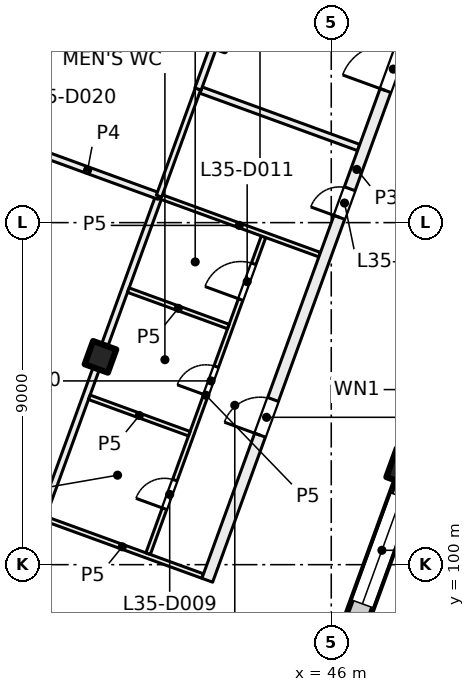
"""IFC4 building model, lengths in metres.
Left out: names, types, materials, properties, quantities, classifications, styles, units other than length and angle.
Written with IfcOpenShell. Run it as: python <this file> out.ifc"""

import sys

from ifc_helpers import new_model, si_unit, direction, frame, frame_2d, origin, origin_2d, place, context, subcontext, project, spatial, rectangle, extrude, element, fill, save


model = new_model("IFC4")
c1 = context("Model", 3, precision=1e-05, world=origin(), true_north=direction((0.0, 1.0)))
c2 = subcontext(c1, "Body", "Model", "MODEL_VIEW")
j1 = project(units=[si_unit("LENGTHUNIT", "METRE"), si_unit("PLANEANGLEUNIT", "RADIAN")], contexts=[c1])
p1 = place(None, origin())
s1 = spatial("IfcSite", under=j1, at=p1, CompositionType="ELEMENT")
p2 = place(p1, origin())
s2 = spatial("IfcBuilding", under=s1, at=p2, CompositionType="ELEMENT")
p3 = place(p2, frame((0.0, 0.0, 150.5)))
s3 = spatial("IfcBuildingStorey", under=s2, at=p3, CompositionType="ELEMENT", Elevation=150.5)
p4 = place(p3, frame((39.927, 105.468, 0.0), z_axis=(0.0, 0.0, 1.0), x_axis=(-0.342020143326, -0.939692620786, 0.0)))
e1 = element("IfcColumn", 1, at=p4, inside=s3, PredefinedType="COLUMN", context=c2, shape_type="SweptSolid", body=[
    extrude(rectangle(XDim=0.65, YDim=0.65, at=origin_2d()), origin(), (0.0, 0.0, 1.0), 4.0),
])
p5 = place(p3, frame((47.962, 102.544, 0.0), z_axis=(0.0, 0.0, 1.0), x_axis=(-0.342020143326, -0.939692620786, 0.0)))
e2 = element("IfcColumn", 2, at=p5, inside=s3, PredefinedType="COLUMN", context=c2, shape_type="SweptSolid", body=[
    extrude(rectangle(XDim=0.8, YDim=0.8, at=origin_2d()), origin(), (0.0, 0.0, 1.0), 4.0),
])
p6 = place(p3, frame((52.212, 113.783, 0.0), z_axis=(0.0, 0.0, 1.0), x_axis=(-0.34202521188, -0.939690775968, 0.0)))
e3 = element("IfcWall", 3, at=p6, inside=s3, PredefinedType="SOLIDWALL", context=c2, shape_type="SweptSolid", body=[
    extrude(rectangle(XDim=21.745, YDim=0.6, at=frame_2d((10.873, 0.0))), origin(), (0.0, 0.0, 1.0), 3.625),
])
p7 = place(p6, frame((3.765, 0.0, 0.9)))
e4 = element("IfcOpeningElement", 4, at=p7, cuts=e3, PredefinedType="OPENING", context=c2, shape_type="SweptSolid", body=[
    extrude(rectangle(XDim=3.0, YDim=2.4, at=frame_2d((1.5, 1.2))), frame((0.0, 0.31, 0.0), z_axis=(0.0, -1.0, 0.0), x_axis=(1.0, 0.0, 0.0)), (0.0, 0.0, 1.0), 0.62),
])
p8 = place(p6, frame((8.265, 0.0, 0.9)))
e5 = element("IfcOpeningElement", 5, at=p8, cuts=e3, PredefinedType="OPENING", context=c2, shape_type="SweptSolid", body=[
    extrude(rectangle(XDim=3.0, YDim=2.4, at=frame_2d((1.5, 1.2))), frame((0.0, 0.31, 0.0), z_axis=(0.0, -1.0, 0.0), x_axis=(1.0, 0.0, 0.0)), (0.0, 0.0, 1.0), 0.62),
])
p9 = place(p6, frame((12.765, 0.0, 0.9)))
e6 = element("IfcOpeningElement", 6, at=p9, cuts=e3, PredefinedType="OPENING", context=c2, shape_type="SweptSolid", body=[
    extrude(rectangle(XDim=3.0, YDim=2.4, at=frame_2d((1.5, 1.2))), frame((0.0, 0.31, 0.0), z_axis=(0.0, -1.0, 0.0), x_axis=(1.0, 0.0, 0.0)), (0.0, 0.0, 1.0), 0.62),
])
p10 = place(p6, frame((17.265, 0.0, 0.9)))
e7 = element("IfcOpeningElement", 7, at=p10, cuts=e3, PredefinedType="OPENING", context=c2, shape_type="SweptSolid", body=[
    extrude(rectangle(XDim=3.0, YDim=2.4, at=frame_2d((1.5, 1.2))), frame((0.0, 0.31, 0.0), z_axis=(0.0, -1.0, 0.0), x_axis=(1.0, 0.0, 0.0)), (0.0, 0.0, 1.0), 0.62),
])
p11 = place(p3, frame((38.385, 101.24, 0.0), z_axis=(0.0, 0.0, 1.0), x_axis=(0.939711088937, -0.341969398235, 0.0)))
e8 = element("IfcWall", 8, at=p11, inside=s3, PredefinedType="PARTITIONING", context=c2, shape_type="SweptSolid", body=[
    extrude(rectangle(XDim=4.503, YDim=0.125, at=frame_2d((2.252, 0.0))), origin(), (0.0, 0.0, 1.0), 3.625),
])
p12 = place(p3, frame((38.418, 101.322, 0.0), z_axis=(0.0, 0.0, 1.0), x_axis=(0.342101536507, 0.939662992099, 0.0)))
e9 = element("IfcWall", 9, at=p12, inside=s3, PredefinedType="PARTITIONING", context=c2, shape_type="SweptSolid", body=[
    extrude(rectangle(XDim=8.913, YDim=0.175, at=frame_2d((4.457, 0.0))), origin(), (0.0, 0.0, 1.0), 3.625),
])
p13 = place(p3, frame((41.181, 100.29, 0.0), z_axis=(0.0, 0.0, 1.0), x_axis=(0.34222012082, 0.939619810831, 0.0)))
e10 = element("IfcWall", 10, at=p13, inside=s3, PredefinedType="PARTITIONING", context=c2, shape_type="SweptSolid", body=[
    extrude(rectangle(XDim=8.875, YDim=0.125, at=frame_2d((4.438, 0.0))), origin(), (0.0, 0.0, 1.0), 3.625),
])
p14 = place(p13, frame((1.258, 0.0, 0.0)))
e11 = element("IfcOpeningElement", 11, at=p14, cuts=e10, PredefinedType="OPENING", context=c2, shape_type="SweptSolid", body=[
    extrude(rectangle(XDim=0.8, YDim=2.1, at=frame_2d((0.4, 1.05))), frame((0.0, 0.073, 0.0), z_axis=(0.0, -1.0, 0.0), x_axis=(1.0, 0.0, 0.0)), (0.0, 0.0, 1.0), 0.145),
])
p15 = place(p13, frame((4.437, 0.0, 0.0)))
e12 = element("IfcOpeningElement", 12, at=p15, cuts=e10, PredefinedType="OPENING", context=c2, shape_type="SweptSolid", body=[
    extrude(rectangle(XDim=0.8, YDim=2.1, at=frame_2d((0.4, 1.05))), frame((0.0, 0.073, 0.0), z_axis=(0.0, -1.0, 0.0), x_axis=(1.0, 0.0, 0.0)), (0.0, 0.0, 1.0), 0.145),
])
p16 = place(p13, frame((7.116, 0.0, 0.0)))
e13 = element("IfcOpeningElement", 13, at=p16, cuts=e10, PredefinedType="OPENING", context=c2, shape_type="SweptSolid", body=[
    extrude(rectangle(XDim=1.0, YDim=2.1, at=frame_2d((0.5, 1.05))), frame((0.0, 0.073, 0.0), z_axis=(0.0, -1.0, 0.0), x_axis=(1.0, 0.0, 0.0)), (0.0, 0.0, 1.0), 0.145),
])
p17 = place(p3, frame((41.467, 109.697, 0.0), z_axis=(0.0, 0.0, 1.0), x_axis=(-0.939713209288, 0.341963571582, 0.0)))
e14 = element("IfcWall", 14, at=p17, inside=s3, PredefinedType="PARTITIONING", context=c2, shape_type="SweptSolid", body=[
    extrude(rectangle(XDim=4.0, YDim=0.175, at=frame_2d((2.0, 0.0))), origin(), (0.0, 0.0, 1.0), 3.625),
])
p18 = place(p3, frame((41.467, 109.697, 0.0), z_axis=(0.0, 0.0, 1.0), x_axis=(0.939609529273, -0.342248349154, 0.0)))
e15 = element("IfcWall", 15, at=p18, inside=s3, PredefinedType="PARTITIONING", context=c2, shape_type="SweptSolid", body=[
    extrude(rectangle(XDim=4.5, YDim=0.125, at=frame_2d((2.25, 0.0))), origin(), (0.0, 0.0, 1.0), 3.625),
])
p19 = place(p3, frame((42.264, 103.446, 0.0), z_axis=(0.0, 0.0, 1.0), x_axis=(-0.939640574808, 0.342163104635, 0.0)))
e16 = element("IfcWall", 16, at=p19, inside=s3, PredefinedType="PARTITIONING", context=c2, shape_type="SweptSolid", body=[
    extrude(rectangle(XDim=2.8, YDim=0.125, at=frame_2d((1.4, 0.0))), origin(), (0.0, 0.0, 1.0), 3.625),
])
p20 = place(p3, frame((42.493, 112.516, 0.0), z_axis=(0.0, 0.0, 1.0), x_axis=(-0.341965219194, -0.939712609717, 0.0)))
e17 = element("IfcWall", 17, at=p20, inside=s3, PredefinedType="PARTITIONING", context=c2, shape_type="SweptSolid", body=[
    extrude(rectangle(XDim=3.0, YDim=0.15, at=frame_2d((1.5, 0.0))), origin(), (0.0, 0.0, 1.0), 3.625),
])
p21 = place(p3, frame((42.575, 112.486, 0.0), z_axis=(0.0, 0.0, 1.0), x_axis=(0.939620446327, -0.342218375959, 0.0)))
e18 = element("IfcWall", 18, at=p21, inside=s3, PredefinedType="PARTITIONING", context=c2, shape_type="SweptSolid", body=[
    extrude(rectangle(XDim=4.412, YDim=0.175, at=frame_2d((2.206, 0.0))), origin(), (0.0, 0.0, 1.0), 3.625),
])
p22 = place(p3, frame((42.737, 99.59, 0.0), z_axis=(0.0, 0.0, 1.0), x_axis=(0.341992703977, 0.939702607438, 0.0)))
e19 = element("IfcWall", 19, at=p22, inside=s3, PredefinedType="PARTITIONING", context=c2, shape_type="SweptSolid", body=[
    extrude(rectangle(XDim=23.006, YDim=0.3, at=frame_2d((11.503, 0.0))), origin(), (0.0, 0.0, 1.0), 3.625),
])
p23 = place(p22, frame((4.062, 0.0, 0.0)))
e20 = element("IfcOpeningElement", 20, at=p23, cuts=e19, PredefinedType="OPENING", context=c2, shape_type="SweptSolid", body=[
    extrude(rectangle(XDim=1.0, YDim=2.1, at=frame_2d((0.5, 1.05))), frame((0.0, 0.16, 0.0), z_axis=(0.0, -1.0, 0.0), x_axis=(1.0, 0.0, 0.0)), (0.0, 0.0, 1.0), 0.32),
])
p24 = place(p22, frame((10.162, 0.0, 0.0)))
e21 = element("IfcOpeningElement", 21, at=p24, cuts=e19, PredefinedType="OPENING", context=c2, shape_type="SweptSolid", body=[
    extrude(rectangle(XDim=0.8, YDim=2.1, at=frame_2d((0.4, 1.05))), frame((0.0, 0.16, 0.0), z_axis=(0.0, -1.0, 0.0), x_axis=(1.0, 0.0, 0.0)), (0.0, 0.0, 1.0), 0.32),
])
p25 = place(p22, frame((13.712, 0.0, 0.0)))
e22 = element("IfcOpeningElement", 22, at=p25, cuts=e19, PredefinedType="OPENING", context=c2, shape_type="SweptSolid", body=[
    extrude(rectangle(XDim=1.2, YDim=2.1, at=frame_2d((0.6, 1.05))), frame((0.0, 0.16, 0.0), z_axis=(0.0, -1.0, 0.0), x_axis=(1.0, 0.0, 0.0)), (0.0, 0.0, 1.0), 0.32),
])
p26 = place(p22, frame((18.662, 0.0, 0.0)))
e23 = element("IfcOpeningElement", 23, at=p26, cuts=e19, PredefinedType="OPENING", context=c2, shape_type="SweptSolid", body=[
    extrude(rectangle(XDim=1.8, YDim=2.1, at=frame_2d((0.9, 1.05))), frame((0.0, 0.16, 0.0), z_axis=(0.0, -1.0, 0.0), x_axis=(1.0, 0.0, 0.0)), (0.0, 0.0, 1.0), 0.32),
])
p27 = place(p3, frame((43.29, 106.266, 0.0), z_axis=(0.0, 0.0, 1.0), x_axis=(-0.939650782256, 0.342135071873, 0.0)))
e24 = element("IfcWall", 24, at=p27, inside=s3, PredefinedType="PARTITIONING", context=c2, shape_type="SweptSolid", body=[
    extrude(rectangle(XDim=2.8, YDim=0.125, at=frame_2d((1.4, 0.0))), origin(), (0.0, 0.0, 1.0), 3.625),
])
p28 = place(p3, frame((44.002, 116.662, 0.0), z_axis=(0.0, 0.0, 1.0), x_axis=(-0.342022951975, -0.939691598517, 0.0)))
e25 = element("IfcWall", 25, at=p28, inside=s3, PredefinedType="PARTITIONING", context=c2, shape_type="SweptSolid", body=[
    extrude(rectangle(XDim=4.412, YDim=0.175, at=frame_2d((2.206, 0.0))), origin(), (0.0, 0.0, 1.0), 3.625),
])
p29 = place(p9, origin())
e26 = element("IfcWindow", 26, at=p29, inside=s3, PartitioningType="SINGLE_PANEL", PredefinedType="WINDOW", context=c2, shape_type="SweptSolid", body=[
    extrude(rectangle(XDim=3.0, YDim=2.4, at=frame_2d((1.5, 1.2))), frame((0.0, 0.03, 0.0), z_axis=(0.0, -1.0, 0.0), x_axis=(1.0, 0.0, 0.0)), (0.0, 0.0, 1.0), 0.06),
])
fill(e6, e26)
p30 = place(p23, origin())
e27 = element("IfcDoor", 27, at=p30, inside=s3, OperationType="SINGLE_SWING_LEFT", PredefinedType="DOOR", context=c2, shape_type="SweptSolid", body=[
    extrude(rectangle(XDim=1.0, YDim=2.1, at=frame_2d((0.5, 1.05))), frame((0.0, 0.025, 0.0), z_axis=(0.0, -1.0, 0.0), x_axis=(1.0, 0.0, 0.0)), (0.0, 0.0, 1.0), 0.05),
])
fill(e20, e27)
p31 = place(p14, origin())
e28 = element("IfcDoor", 28, at=p31, inside=s3, OperationType="SINGLE_SWING_LEFT", PredefinedType="DOOR", context=c2, shape_type="SweptSolid", body=[
    extrude(rectangle(XDim=0.8, YDim=2.1, at=frame_2d((0.4, 1.05))), frame((0.0, 0.025, 0.0), z_axis=(0.0, -1.0, 0.0), x_axis=(1.0, 0.0, 0.0)), (0.0, 0.0, 1.0), 0.05),
])
fill(e11, e28)
p32 = place(p15, origin())
e29 = element("IfcDoor", 29, at=p32, inside=s3, OperationType="SINGLE_SWING_LEFT", PredefinedType="DOOR", context=c2, shape_type="SweptSolid", body=[
    extrude(rectangle(XDim=0.8, YDim=2.1, at=frame_2d((0.4, 1.05))), frame((0.0, 0.025, 0.0), z_axis=(0.0, -1.0, 0.0), x_axis=(1.0, 0.0, 0.0)), (0.0, 0.0, 1.0), 0.05),
])
fill(e12, e29)
p33 = place(p16, origin())
e30 = element("IfcDoor", 30, at=p33, inside=s3, OperationType="SINGLE_SWING_LEFT", PredefinedType="DOOR", context=c2, shape_type="SweptSolid", body=[
    extrude(rectangle(XDim=1.0, YDim=2.1, at=frame_2d((0.5, 1.05))), frame((0.0, 0.025, 0.0), z_axis=(0.0, -1.0, 0.0), x_axis=(1.0, 0.0, 0.0)), (0.0, 0.0, 1.0), 0.05),
])
fill(e13, e30)
p34 = place(p24, origin())
e31 = element("IfcDoor", 31, at=p34, inside=s3, OperationType="SINGLE_SWING_RIGHT", PredefinedType="DOOR", context=c2, shape_type="SweptSolid", body=[
    extrude(rectangle(XDim=0.8, YDim=2.1, at=frame_2d((0.4, 1.05))), frame((0.0, 0.025, 0.0), z_axis=(0.0, -1.0, 0.0), x_axis=(1.0, 0.0, 0.0)), (0.0, 0.0, 1.0), 0.05),
])
fill(e21, e31)
p35 = place(p25, origin())
e32 = element("IfcDoor", 32, at=p35, inside=s3, OperationType="DOUBLE_DOOR_SINGLE_SWING", PredefinedType="DOOR", context=c2, shape_type="SweptSolid", body=[
    extrude(rectangle(XDim=1.2, YDim=2.1, at=frame_2d((0.6, 1.05))), frame((0.0, 0.025, 0.0), z_axis=(0.0, -1.0, 0.0), x_axis=(1.0, 0.0, 0.0)), (0.0, 0.0, 1.0), 0.05),
])
fill(e22, e32)
save(model, sys.argv[1])
